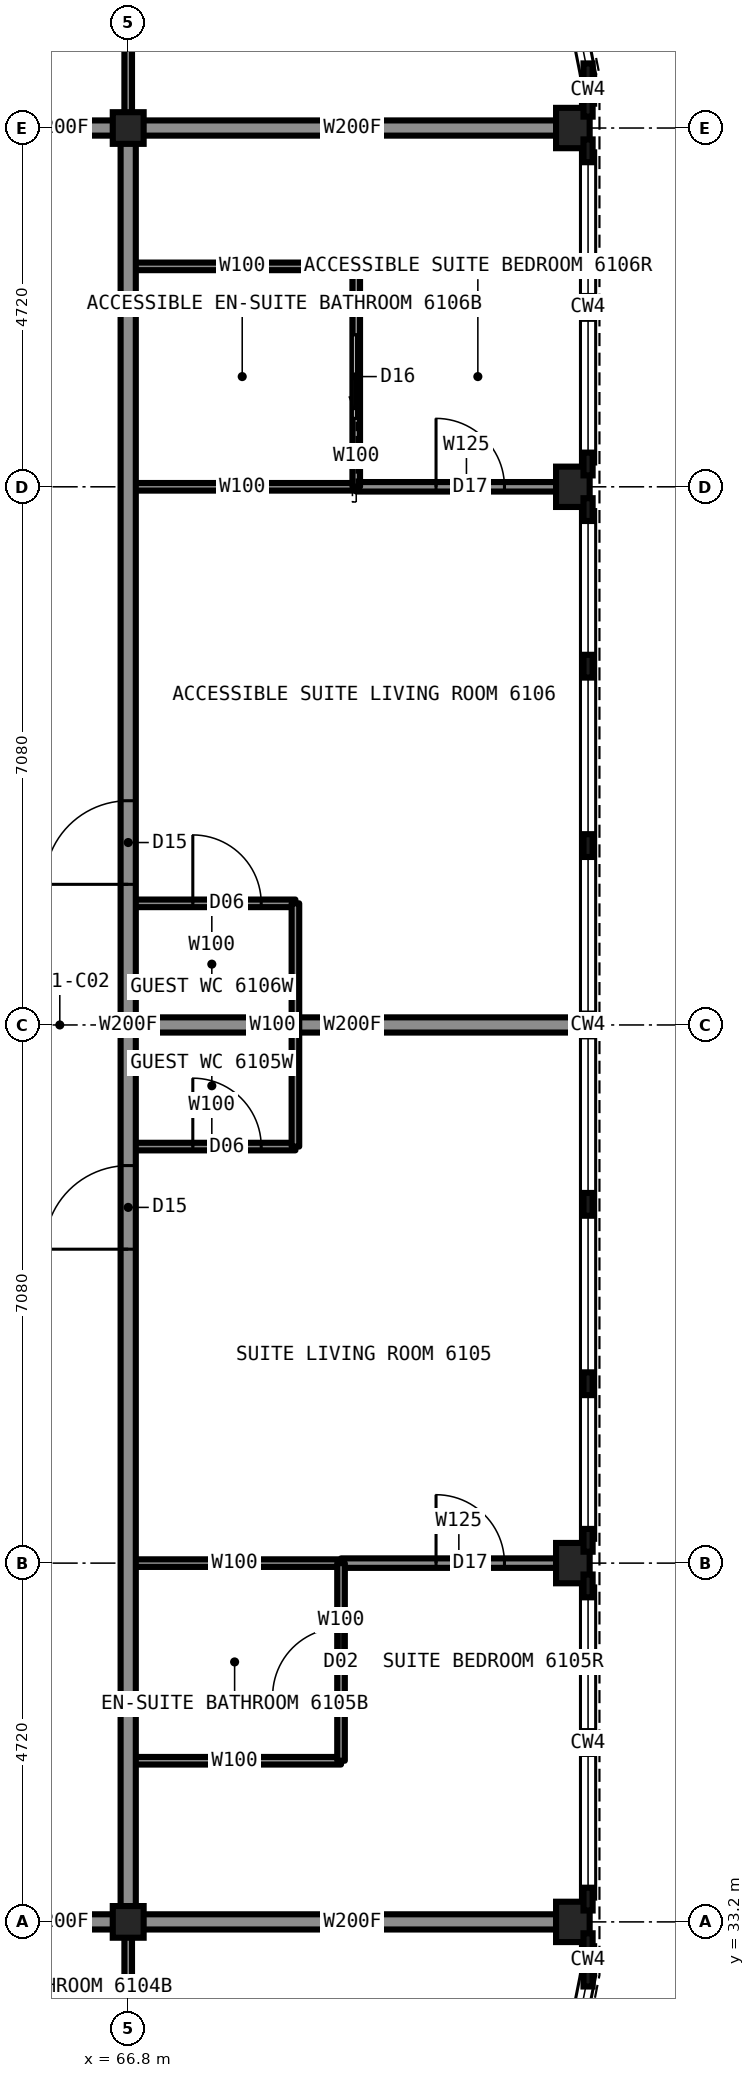
"""IFC4 building model, lengths in metres.
Left out: names, types, materials, properties, quantities, classifications, styles, units other than length and angle.
Written with IfcOpenShell. Run it as: python <this file> out.ifc"""

import sys

from ifc_helpers import new_model, si_unit, direction, frame, frame_2d, origin, origin_2d, place, context, subcontext, project, spatial, rectangle, i_section, extrude, element, fill, save


model = new_model("IFC4")
c1 = context("Model", 3, precision=1e-05, world=origin(), true_north=direction((0.0, 1.0)))
c2 = subcontext(c1, "Body", "Model", "MODEL_VIEW")
j1 = project(units=[si_unit("LENGTHUNIT", "METRE"), si_unit("PLANEANGLEUNIT", "RADIAN")], contexts=[c1])
p1 = place(None, origin())
s1 = spatial("IfcSite", under=j1, at=p1, CompositionType="ELEMENT")
p2 = place(p1, origin())
s2 = spatial("IfcBuilding", under=s1, at=p2, CompositionType="ELEMENT")
p3 = place(p2, frame((0.0, 0.0, 226.7)))
s3 = spatial("IfcBuildingStorey", under=s2, at=p3, CompositionType="ELEMENT", Elevation=226.7)
for number, where, z_axis, x_axis in (
    (1, (72.65, 33.2, 0.0), (0.0, 0.0, 1.0), (1.0, 0.0, 0.0)),
    (2, (72.65, 37.92, 0.0), (0.0, 0.0, 1.0), (1.0, 0.0, 0.0)),
    (3, (72.65, 52.08, 0.0), (0.0, 0.0, 1.0), (1.0, 0.0, 0.0)),
    (4, (72.65, 56.8, 0.0), (0.0, 0.0, 1.0), (1.0, 0.0, 0.0)),
):
    element("IfcColumn", number, at=place(p3, frame(where, z_axis=z_axis, x_axis=x_axis)), inside=s3, PredefinedType="COLUMN", context=c2, shape_type="SweptSolid", body=[
        extrude(i_section(OverallWidth=0.442, OverallDepth=0.531, WebThickness=0.066, FlangeThickness=0.106, at=origin_2d()), origin(), (0.0, 0.0, 1.0), 3.5),
    ])
for number, where, z_axis, x_axis in (
    (5, (66.8, 33.2, 0.0), (0.0, 0.0, 1.0), (1.0, 0.0, 0.0)),
    (6, (66.8, 56.8, 0.0), (0.0, 0.0, 1.0), (1.0, 0.0, 0.0)),
):
    element("IfcColumn", number, at=place(p3, frame(where, z_axis=z_axis, x_axis=x_axis)), inside=s3, PredefinedType="COLUMN", context=c2, shape_type="SweptSolid", body=[
        extrude(i_section(OverallWidth=0.406, OverallDepth=0.417, WebThickness=0.03, FlangeThickness=0.048, at=origin_2d()), origin(), (0.0, 0.0, 1.0), 3.5),
    ])
p4 = place(p3, frame((66.8, 43.4, 0.0), z_axis=(0.0, 0.0, 1.0), x_axis=(1.0, 0.0, 0.0)))
e7 = element("IfcWall", 7, at=p4, inside=s3, PredefinedType="PARTITIONING", context=c2, shape_type="SweptSolid", body=[
    extrude(rectangle(XDim=2.2, YDim=0.1, at=frame_2d((1.1, 0.0))), origin(), (0.0, 0.0, 1.0), 3.33),
])
p5 = place(p4, frame((0.85, 0.0, 0.0)))
e8 = element("IfcOpeningElement", 8, at=p5, cuts=e7, PredefinedType="OPENING", context=c2, shape_type="SweptSolid", body=[
    extrude(rectangle(XDim=0.9, YDim=2.1, at=frame_2d((0.45, 1.05))), frame((0.0, 0.06, 0.0), z_axis=(0.0, -1.0, 0.0), x_axis=(1.0, 0.0, 0.0)), (0.0, 0.0, 1.0), 0.12),
])
p6 = place(p3, frame((65.0, 33.2, 0.0), z_axis=(0.0, 0.0, 1.0), x_axis=(1.0, 0.0, 0.0)))
e9 = element("IfcWall", 9, at=p6, inside=s3, PredefinedType="PARTITIONING", context=c2, shape_type="SweptSolid", body=[
    extrude(rectangle(XDim=1.8, YDim=0.2, at=frame_2d((0.9, 0.0))), origin(), (0.0, 0.0, 1.0), 3.33),
])
p7 = place(p3, frame((66.8, 33.2, 0.0), z_axis=(0.0, 0.0, 1.0), x_axis=(1.0, 0.0, 0.0)))
e10 = element("IfcWall", 10, at=p7, inside=s3, PredefinedType="PARTITIONING", context=c2, shape_type="SweptSolid", body=[
    extrude(rectangle(XDim=5.9, YDim=0.2, at=frame_2d((2.95, 0.0))), origin(), (0.0, 0.0, 1.0), 2.573),
])
p8 = place(p3, frame((66.8, 37.92, 0.0), z_axis=(0.0, 0.0, 1.0), x_axis=(1.0, 0.0, 0.0)))
e11 = element("IfcWall", 11, at=p8, inside=s3, PredefinedType="PARTITIONING", context=c2, shape_type="SweptSolid", body=[
    extrude(rectangle(XDim=2.8, YDim=0.1, at=frame_2d((1.4, 0.0))), origin(), (0.0, 0.0, 1.0), 2.573),
])
p9 = place(p3, frame((69.6, 37.92, 0.0), z_axis=(0.0, 0.0, 1.0), x_axis=(1.0, 0.0, 0.0)))
e12 = element("IfcWall", 12, at=p9, inside=s3, PredefinedType="PARTITIONING", context=c2, shape_type="SweptSolid", body=[
    extrude(rectangle(XDim=3.1, YDim=0.125, at=frame_2d((1.55, 0.0))), origin(), (0.0, 0.0, 1.0), 2.573),
])
p10 = place(p9, frame((1.25, 0.0, 0.0)))
e13 = element("IfcOpeningElement", 13, at=p10, cuts=e12, PredefinedType="OPENING", context=c2, shape_type="SweptSolid", body=[
    extrude(rectangle(XDim=0.9, YDim=2.2, at=frame_2d((0.45, 1.1))), frame((0.0, 0.073, 0.0), z_axis=(0.0, -1.0, 0.0), x_axis=(1.0, 0.0, 0.0)), (0.0, 0.0, 1.0), 0.145),
])
p11 = place(p3, frame((66.8, 35.32, 0.0), z_axis=(0.0, 0.0, 1.0), x_axis=(1.0, 0.0, 0.0)))
e14 = element("IfcWall", 14, at=p11, inside=s3, PredefinedType="PARTITIONING", context=c2, shape_type="SweptSolid", body=[
    extrude(rectangle(XDim=2.8, YDim=0.1, at=frame_2d((1.4, 0.0))), origin(), (0.0, 0.0, 1.0), 3.33),
])
p12 = place(p3, frame((66.8, 45.0, 0.0), z_axis=(0.0, 0.0, 1.0), x_axis=(1.0, 0.0, 0.0)))
e15 = element("IfcWall", 15, at=p12, inside=s3, PredefinedType="PARTITIONING", context=c2, shape_type="SweptSolid", body=[
    extrude(rectangle(XDim=5.9, YDim=0.2, at=frame_2d((2.95, 0.0))), origin(), (0.0, 0.0, 1.0), 2.797),
])
p13 = place(p3, frame((66.8, 46.6, 0.0), z_axis=(0.0, 0.0, 1.0), x_axis=(1.0, 0.0, 0.0)))
e16 = element("IfcWall", 16, at=p13, inside=s3, PredefinedType="PARTITIONING", context=c2, shape_type="SweptSolid", body=[
    extrude(rectangle(XDim=2.2, YDim=0.1, at=frame_2d((1.1, 0.0))), origin(), (0.0, 0.0, 1.0), 3.33),
])
p14 = place(p13, frame((0.85, 0.0, 0.0)))
e17 = element("IfcOpeningElement", 17, at=p14, cuts=e16, PredefinedType="OPENING", context=c2, shape_type="SweptSolid", body=[
    extrude(rectangle(XDim=0.9, YDim=2.1, at=frame_2d((0.45, 1.05))), frame((0.0, 0.06, 0.0), z_axis=(0.0, -1.0, 0.0), x_axis=(1.0, 0.0, 0.0)), (0.0, 0.0, 1.0), 0.12),
])
p15 = place(p3, frame((65.0, 56.8, 0.0), z_axis=(0.0, 0.0, 1.0), x_axis=(1.0, 0.0, 0.0)))
e18 = element("IfcWall", 18, at=p15, inside=s3, PredefinedType="PARTITIONING", context=c2, shape_type="SweptSolid", body=[
    extrude(rectangle(XDim=1.8, YDim=0.2, at=frame_2d((0.9, 0.0))), origin(), (0.0, 0.0, 1.0), 3.33),
])
p16 = place(p3, frame((66.8, 56.8, 0.0), z_axis=(0.0, 0.0, 1.0), x_axis=(1.0, 0.0, 0.0)))
e19 = element("IfcWall", 19, at=p16, inside=s3, PredefinedType="PARTITIONING", context=c2, shape_type="SweptSolid", body=[
    extrude(rectangle(XDim=5.9, YDim=0.2, at=frame_2d((2.95, 0.0))), origin(), (0.0, 0.0, 1.0), 2.573),
])
p17 = place(p3, frame((66.8, 52.08, 0.0), z_axis=(0.0, 0.0, 1.0), x_axis=(1.0, 0.0, 0.0)))
e20 = element("IfcWall", 20, at=p17, inside=s3, PredefinedType="PARTITIONING", context=c2, shape_type="SweptSolid", body=[
    extrude(rectangle(XDim=3.0, YDim=0.1, at=frame_2d((1.5, 0.0))), origin(), (0.0, 0.0, 1.0), 2.573),
])
p18 = place(p3, frame((69.8, 52.08, 0.0), z_axis=(0.0, 0.0, 1.0), x_axis=(1.0, 0.0, 0.0)))
e21 = element("IfcWall", 21, at=p18, inside=s3, PredefinedType="PARTITIONING", context=c2, shape_type="SweptSolid", body=[
    extrude(rectangle(XDim=2.9, YDim=0.125, at=frame_2d((1.45, 0.0))), origin(), (0.0, 0.0, 1.0), 2.573),
])
p19 = place(p18, frame((1.05, 0.0, 0.0)))
e22 = element("IfcOpeningElement", 22, at=p19, cuts=e21, PredefinedType="OPENING", context=c2, shape_type="SweptSolid", body=[
    extrude(rectangle(XDim=0.9, YDim=2.2, at=frame_2d((0.45, 1.1))), frame((0.0, 0.073, 0.0), z_axis=(0.0, -1.0, 0.0), x_axis=(1.0, 0.0, 0.0)), (0.0, 0.0, 1.0), 0.145),
])
p20 = place(p3, frame((66.8, 54.98, 0.0), z_axis=(0.0, 0.0, 1.0), x_axis=(1.0, 0.0, 0.0)))
e23 = element("IfcWall", 23, at=p20, inside=s3, PredefinedType="PARTITIONING", context=c2, shape_type="SweptSolid", body=[
    extrude(rectangle(XDim=3.0, YDim=0.1, at=frame_2d((1.5, 0.0))), origin(), (0.0, 0.0, 1.0), 3.33),
])
for number, where, z_axis, x_axis in (
    (24, (66.8, 30.4, 0.0), (0.0, 0.0, 1.0), (0.0, 1.0, 0.0)),
    (25, (66.8, 56.8, 0.0), (0.0, 0.0, 1.0), (0.0, 1.0, 0.0)),
):
    element("IfcWall", number, at=place(p3, frame(where, z_axis=z_axis, x_axis=x_axis)), inside=s3, PredefinedType="PARTITIONING", context=c2, shape_type="SweptSolid", body=[
        extrude(rectangle(XDim=2.8, YDim=0.1, at=frame_2d((1.4, 0.0))), origin(), (0.0, 0.0, 1.0), 2.573),
    ])
p21 = place(p3, frame((66.8, 33.2, 0.0), z_axis=(0.0, 0.0, 1.0), x_axis=(0.0, 1.0, 0.0)))
e26 = element("IfcWall", 26, at=p21, inside=s3, PredefinedType="PARTITIONING", context=c2, shape_type="SweptSolid", body=[
    extrude(rectangle(XDim=23.6, YDim=0.2, at=frame_2d((11.8, 0.0))), origin(), (0.0, 0.0, 1.0), 3.33),
])
p22 = place(p21, frame((8.85, 0.0, 0.0)))
e27 = element("IfcOpeningElement", 27, at=p22, cuts=e26, PredefinedType="OPENING", context=c2, shape_type="SweptSolid", body=[
    extrude(rectangle(XDim=1.1, YDim=2.2, at=frame_2d((0.55, 1.1))), frame((0.0, 0.11, 0.0), z_axis=(0.0, -1.0, 0.0), x_axis=(1.0, 0.0, 0.0)), (0.0, 0.0, 1.0), 0.22),
])
p23 = place(p21, frame((13.65, 0.0, 0.0)))
e28 = element("IfcOpeningElement", 28, at=p23, cuts=e26, PredefinedType="OPENING", context=c2, shape_type="SweptSolid", body=[
    extrude(rectangle(XDim=1.1, YDim=2.2, at=frame_2d((0.55, 1.1))), frame((0.0, 0.11, 0.0), z_axis=(0.0, -1.0, 0.0), x_axis=(1.0, 0.0, 0.0)), (0.0, 0.0, 1.0), 0.22),
])
p24 = place(p3, frame((69.0, 43.4, 0.0), z_axis=(0.0, 0.0, 1.0), x_axis=(0.0, 1.0, 0.0)))
e29 = element("IfcWall", 29, at=p24, inside=s3, PredefinedType="PARTITIONING", context=c2, shape_type="SweptSolid", body=[
    extrude(rectangle(XDim=3.2, YDim=0.1, at=frame_2d((1.6, 0.0))), origin(), (0.0, 0.0, 1.0), 3.33),
])
p25 = place(p3, frame((69.6, 35.32, 0.0), z_axis=(0.0, 0.0, 1.0), x_axis=(0.0, 1.0, 0.0)))
e30 = element("IfcWall", 30, at=p25, inside=s3, PredefinedType="PARTITIONING", context=c2, shape_type="SweptSolid", body=[
    extrude(rectangle(XDim=2.6, YDim=0.1, at=frame_2d((1.3, 0.0))), origin(), (0.0, 0.0, 1.0), 3.33),
])
p26 = place(p25, frame((0.85, 0.0, 0.0)))
e31 = element("IfcOpeningElement", 31, at=p26, cuts=e30, PredefinedType="OPENING", context=c2, shape_type="SweptSolid", body=[
    extrude(rectangle(XDim=0.9, YDim=2.1, at=frame_2d((0.45, 1.05))), frame((0.0, 0.06, 0.0), z_axis=(0.0, -1.0, 0.0), x_axis=(1.0, 0.0, 0.0)), (0.0, 0.0, 1.0), 0.12),
])
p27 = place(p3, frame((69.8, 52.08, 0.0), z_axis=(0.0, 0.0, 1.0), x_axis=(0.0, 1.0, 0.0)))
e32 = element("IfcWall", 32, at=p27, inside=s3, PredefinedType="PARTITIONING", context=c2, shape_type="SweptSolid", body=[
    extrude(rectangle(XDim=2.9, YDim=0.1, at=frame_2d((1.45, 0.0))), origin(), (0.0, 0.0, 1.0), 3.33),
])
p28 = place(p27, frame((0.9, 0.0, 0.0)))
e33 = element("IfcOpeningElement", 33, at=p28, cuts=e32, PredefinedType="OPENING", context=c2, shape_type="SweptSolid", body=[
    extrude(rectangle(XDim=1.1, YDim=2.1, at=frame_2d((0.55, 1.05))), frame((0.0, 0.06, 0.0), z_axis=(0.0, -1.0, 0.0), x_axis=(1.0, 0.0, 0.0)), (0.0, 0.0, 1.0), 0.12),
])
p29 = place(p22, origin())
e34 = element("IfcDoor", 34, at=p29, inside=s3, OperationType="SINGLE_SWING_LEFT", PredefinedType="DOOR", context=c2, shape_type="SweptSolid", body=[
    extrude(rectangle(XDim=1.1, YDim=2.2, at=frame_2d((0.55, 1.1))), frame((0.0, 0.025, 0.0), z_axis=(0.0, -1.0, 0.0), x_axis=(1.0, 0.0, 0.0)), (0.0, 0.0, 1.0), 0.05),
])
fill(e27, e34)
p30 = place(p26, origin())
e35 = element("IfcDoor", 35, at=p30, inside=s3, OperationType="SINGLE_SWING_RIGHT", PredefinedType="DOOR", context=c2, shape_type="SweptSolid", body=[
    extrude(rectangle(XDim=0.9, YDim=2.1, at=frame_2d((0.45, 1.05))), frame((0.0, 0.025, 0.0), z_axis=(0.0, -1.0, 0.0), x_axis=(1.0, 0.0, 0.0)), (0.0, 0.0, 1.0), 0.05),
])
fill(e31, e35)
p31 = place(p10, origin())
e36 = element("IfcDoor", 36, at=p31, inside=s3, OperationType="SINGLE_SWING_LEFT", PredefinedType="DOOR", context=c2, shape_type="SweptSolid", body=[
    extrude(rectangle(XDim=0.9, YDim=2.2, at=frame_2d((0.45, 1.1))), frame((0.0, 0.025, 0.0), z_axis=(0.0, -1.0, 0.0), x_axis=(1.0, 0.0, 0.0)), (0.0, 0.0, 1.0), 0.05),
])
fill(e13, e36)
p32 = place(p5, origin())
e37 = element("IfcDoor", 37, at=p32, inside=s3, OperationType="SINGLE_SWING_LEFT", PredefinedType="DOOR", context=c2, shape_type="SweptSolid", body=[
    extrude(rectangle(XDim=0.9, YDim=2.1, at=frame_2d((0.45, 1.05))), frame((0.0, 0.025, 0.0), z_axis=(0.0, -1.0, 0.0), x_axis=(1.0, 0.0, 0.0)), (0.0, 0.0, 1.0), 0.05),
])
fill(e8, e37)
p33 = place(p23, origin())
e38 = element("IfcDoor", 38, at=p33, inside=s3, OperationType="SINGLE_SWING_LEFT", PredefinedType="DOOR", context=c2, shape_type="SweptSolid", body=[
    extrude(rectangle(XDim=1.1, YDim=2.2, at=frame_2d((0.55, 1.1))), frame((0.0, 0.025, 0.0), z_axis=(0.0, -1.0, 0.0), x_axis=(1.0, 0.0, 0.0)), (0.0, 0.0, 1.0), 0.05),
])
fill(e28, e38)
p34 = place(p28, origin())
e39 = element("IfcDoor", 39, at=p34, inside=s3, OperationType="SLIDING_TO_LEFT", PredefinedType="DOOR", context=c2, shape_type="SweptSolid", body=[
    extrude(rectangle(XDim=1.1, YDim=2.1, at=frame_2d((0.55, 1.05))), frame((0.0, 0.025, 0.0), z_axis=(0.0, -1.0, 0.0), x_axis=(1.0, 0.0, 0.0)), (0.0, 0.0, 1.0), 0.05),
])
fill(e33, e39)
p35 = place(p19, origin())
e40 = element("IfcDoor", 40, at=p35, inside=s3, OperationType="SINGLE_SWING_LEFT", PredefinedType="DOOR", context=c2, shape_type="SweptSolid", body=[
    extrude(rectangle(XDim=0.9, YDim=2.2, at=frame_2d((0.45, 1.1))), frame((0.0, 0.025, 0.0), z_axis=(0.0, -1.0, 0.0), x_axis=(1.0, 0.0, 0.0)), (0.0, 0.0, 1.0), 0.05),
])
fill(e22, e40)
p36 = place(p14, origin())
e41 = element("IfcDoor", 41, at=p36, inside=s3, OperationType="SINGLE_SWING_LEFT", PredefinedType="DOOR", context=c2, shape_type="SweptSolid", body=[
    extrude(rectangle(XDim=0.9, YDim=2.1, at=frame_2d((0.45, 1.05))), frame((0.0, 0.025, 0.0), z_axis=(0.0, -1.0, 0.0), x_axis=(1.0, 0.0, 0.0)), (0.0, 0.0, 1.0), 0.05),
])
fill(e17, e41)
save(model, sys.argv[1])
